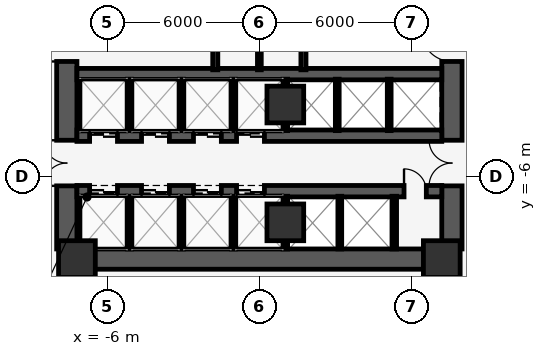
"""IFC4 building model, lengths in metres.
Left out: names, types, materials, properties, quantities, classifications, styles, units other than length and angle.
Written with IfcOpenShell. Run it as: python <this file> out.ifc"""

import sys

from ifc_helpers import new_model, si_unit, direction, frame, frame_2d, origin, origin_2d, place, context, subcontext, project, spatial, rectangle, extrude, element, fill, save


model = new_model("IFC4")
c1 = context("Model", 3, precision=1e-05, world=origin(), true_north=direction((0.0, 1.0)))
c2 = subcontext(c1, "Body", "Model", "MODEL_VIEW")
j1 = project(units=[si_unit("LENGTHUNIT", "METRE"), si_unit("PLANEANGLEUNIT", "RADIAN")], contexts=[c1])
p1 = place(None, origin())
s1 = spatial("IfcSite", under=j1, at=p1, CompositionType="ELEMENT")
p2 = place(p1, origin())
s2 = spatial("IfcBuilding", under=s1, at=p2, CompositionType="ELEMENT")
p3 = place(p2, frame((0.0, 0.0, 62.4)))
s3 = spatial("IfcBuildingStorey", under=s2, at=p3, CompositionType="ELEMENT", Elevation=62.4)
p4 = place(p3, frame((-7.6, -8.85, 0.0), z_axis=(0.0, 0.0, 1.0), x_axis=(0.0, 1.0, 0.0)))
e1 = element("IfcWall", 1, at=p4, inside=s3, PredefinedType="SHEAR", context=c2, shape_type="SweptSolid", body=[
    extrude(rectangle(XDim=8.95, YDim=0.8, at=frame_2d((4.475, 0.0))), origin(), (0.0, 0.0, 1.0), 4.35),
])
p5 = place(p4, frame((2.49, 0.0, 0.0)))
e2 = element("IfcOpeningElement", 2, at=p5, cuts=e1, PredefinedType="OPENING", context=c2, shape_type="SweptSolid", body=[
    extrude(rectangle(XDim=1.8, YDim=2.2, at=frame_2d((0.9, 1.1))), frame((0.0, 0.41, 0.0), z_axis=(0.0, -1.0, 0.0), x_axis=(1.0, 0.0, 0.0)), (0.0, 0.0, 1.0), 0.82),
])
p6 = place(p4, frame((7.4, 0.0, 0.0)))
e3 = element("IfcOpeningElement", 3, at=p6, cuts=e1, PredefinedType="OPENING", context=c2, shape_type="SweptSolid", body=[
    extrude(rectangle(XDim=1.2, YDim=2.15, at=frame_2d((0.6, 1.075))), frame((0.0, 0.41, 0.0), z_axis=(0.0, -1.0, 0.0), x_axis=(1.0, 0.0, 0.0)), (0.0, 0.0, 1.0), 0.82),
])
p7 = place(p3, frame((7.6, -8.85, 0.0), z_axis=(0.0, 0.0, 1.0), x_axis=(0.0, 1.0, 0.0)))
e4 = element("IfcWall", 4, at=p7, inside=s3, PredefinedType="SHEAR", context=c2, shape_type="SweptSolid", body=[
    extrude(rectangle(XDim=8.95, YDim=0.8, at=frame_2d((4.475, 0.0))), origin(), (0.0, 0.0, 1.0), 4.35),
])
p8 = place(p7, frame((2.49, 0.0, 0.0)))
e5 = element("IfcOpeningElement", 5, at=p8, cuts=e4, PredefinedType="OPENING", context=c2, shape_type="SweptSolid", body=[
    extrude(rectangle(XDim=1.8, YDim=2.2, at=frame_2d((0.9, 1.1))), frame((0.0, 0.41, 0.0), z_axis=(0.0, -1.0, 0.0), x_axis=(1.0, 0.0, 0.0)), (0.0, 0.0, 1.0), 0.82),
])
p9 = place(p7, frame((7.4, 0.0, 0.0)))
e6 = element("IfcOpeningElement", 6, at=p9, cuts=e4, PredefinedType="OPENING", context=c2, shape_type="SweptSolid", body=[
    extrude(rectangle(XDim=1.2, YDim=2.15, at=frame_2d((0.6, 1.075))), frame((0.0, 0.41, 0.0), z_axis=(0.0, -1.0, 0.0), x_axis=(1.0, 0.0, 0.0)), (0.0, 0.0, 1.0), 0.82),
])
p10 = place(p3, frame((-7.6, -9.25, 0.0), z_axis=(0.0, 0.0, 1.0), x_axis=(1.0, 0.0, 0.0)))
e7 = element("IfcWall", 7, at=p10, inside=s3, PredefinedType="SHEAR", context=c2, shape_type="SweptSolid", body=[
    extrude(rectangle(XDim=15.2, YDim=0.8, at=frame_2d((7.6, 0.0))), origin(), (0.0, 0.0, 1.0), 4.35),
])
p11 = place(p3, frame((-7.2, -1.95, 0.0), z_axis=(0.0, 0.0, 1.0), x_axis=(1.0, 0.0, 0.0)))
e8 = element("IfcWall", 8, at=p11, inside=s3, PredefinedType="SHEAR", context=c2, shape_type="SweptSolid", body=[
    extrude(rectangle(XDim=14.4, YDim=0.45, at=frame_2d((7.2, 0.0))), origin(), (0.0, 0.0, 1.0), 4.35),
])
p12 = place(p3, frame((-7.2, -4.38, 0.0), z_axis=(0.0, 0.0, 1.0), x_axis=(1.0, 0.0, 0.0)))
e9 = element("IfcWall", 9, at=p12, inside=s3, PredefinedType="SHEAR", context=c2, shape_type="SweptSolid", body=[
    extrude(rectangle(XDim=14.4, YDim=0.45, at=frame_2d((7.2, 0.0))), origin(), (0.0, 0.0, 1.0), 4.35),
])
p13 = place(p12, frame((0.5, 0.0, 0.0)))
e10 = element("IfcOpeningElement", 10, at=p13, cuts=e9, PredefinedType="OPENING", context=c2, shape_type="SweptSolid", body=[
    extrude(rectangle(XDim=1.1, YDim=2.2, at=frame_2d((0.55, 1.1))), frame((0.0, 0.235, 0.0), z_axis=(0.0, -1.0, 0.0), x_axis=(1.0, 0.0, 0.0)), (0.0, 0.0, 1.0), 0.47),
])
p14 = place(p12, frame((2.55, 0.0, 0.0)))
e11 = element("IfcOpeningElement", 11, at=p14, cuts=e9, PredefinedType="OPENING", context=c2, shape_type="SweptSolid", body=[
    extrude(rectangle(XDim=1.1, YDim=2.2, at=frame_2d((0.55, 1.1))), frame((0.0, 0.235, 0.0), z_axis=(0.0, -1.0, 0.0), x_axis=(1.0, 0.0, 0.0)), (0.0, 0.0, 1.0), 0.47),
])
p15 = place(p12, frame((4.6, 0.0, 0.0)))
e12 = element("IfcOpeningElement", 12, at=p15, cuts=e9, PredefinedType="OPENING", context=c2, shape_type="SweptSolid", body=[
    extrude(rectangle(XDim=1.1, YDim=2.2, at=frame_2d((0.55, 1.1))), frame((0.0, 0.235, 0.0), z_axis=(0.0, -1.0, 0.0), x_axis=(1.0, 0.0, 0.0)), (0.0, 0.0, 1.0), 0.47),
])
p16 = place(p12, frame((6.3, 0.0, 0.0)))
e13 = element("IfcOpeningElement", 13, at=p16, cuts=e9, PredefinedType="OPENING", context=c2, shape_type="SweptSolid", body=[
    extrude(rectangle(XDim=1.1, YDim=2.2, at=frame_2d((0.55, 1.1))), frame((0.0, 0.235, 0.0), z_axis=(0.0, -1.0, 0.0), x_axis=(1.0, 0.0, 0.0)), (0.0, 0.0, 1.0), 0.47),
])
p17 = place(p3, frame((-7.2, -6.57, 0.0), z_axis=(0.0, 0.0, 1.0), x_axis=(1.0, 0.0, 0.0)))
e14 = element("IfcWall", 14, at=p17, inside=s3, PredefinedType="SHEAR", context=c2, shape_type="SweptSolid", body=[
    extrude(rectangle(XDim=14.4, YDim=0.45, at=frame_2d((7.2, 0.0))), origin(), (0.0, 0.0, 1.0), 4.35),
])
p18 = place(p17, frame((0.5, 0.0, 0.0)))
e15 = element("IfcOpeningElement", 15, at=p18, cuts=e14, PredefinedType="OPENING", context=c2, shape_type="SweptSolid", body=[
    extrude(rectangle(XDim=1.1, YDim=2.2, at=frame_2d((0.55, 1.1))), frame((0.0, 0.235, 0.0), z_axis=(0.0, -1.0, 0.0), x_axis=(1.0, 0.0, 0.0)), (0.0, 0.0, 1.0), 0.47),
])
p19 = place(p17, frame((2.55, 0.0, 0.0)))
e16 = element("IfcOpeningElement", 16, at=p19, cuts=e14, PredefinedType="OPENING", context=c2, shape_type="SweptSolid", body=[
    extrude(rectangle(XDim=1.1, YDim=2.2, at=frame_2d((0.55, 1.1))), frame((0.0, 0.235, 0.0), z_axis=(0.0, -1.0, 0.0), x_axis=(1.0, 0.0, 0.0)), (0.0, 0.0, 1.0), 0.47),
])
p20 = place(p17, frame((4.6, 0.0, 0.0)))
e17 = element("IfcOpeningElement", 17, at=p20, cuts=e14, PredefinedType="OPENING", context=c2, shape_type="SweptSolid", body=[
    extrude(rectangle(XDim=1.1, YDim=2.2, at=frame_2d((0.55, 1.1))), frame((0.0, 0.235, 0.0), z_axis=(0.0, -1.0, 0.0), x_axis=(1.0, 0.0, 0.0)), (0.0, 0.0, 1.0), 0.47),
])
p21 = place(p17, frame((6.3, 0.0, 0.0)))
e18 = element("IfcOpeningElement", 18, at=p21, cuts=e14, PredefinedType="OPENING", context=c2, shape_type="SweptSolid", body=[
    extrude(rectangle(XDim=1.1, YDim=2.2, at=frame_2d((0.55, 1.1))), frame((0.0, 0.235, 0.0), z_axis=(0.0, -1.0, 0.0), x_axis=(1.0, 0.0, 0.0)), (0.0, 0.0, 1.0), 0.47),
])
p22 = place(p17, frame((12.91, 0.0, 0.0)))
e19 = element("IfcOpeningElement", 19, at=p22, cuts=e14, PredefinedType="OPENING", context=c2, shape_type="SweptSolid", body=[
    extrude(rectangle(XDim=0.88, YDim=2.15, at=frame_2d((0.44, 1.075))), frame((0.0, 0.235, 0.0), z_axis=(0.0, -1.0, 0.0), x_axis=(1.0, 0.0, 0.0)), (0.0, 0.0, 1.0), 0.47),
])
for number, where, z_axis, x_axis in (
    (20, (-7.2, -9.25, 0.0), (0.0, 0.0, 1.0), (1.0, 0.0, 0.0)),
    (21, (7.2, -9.25, 0.0), (0.0, 0.0, 1.0), (1.0, 0.0, 0.0)),
    (22, (1.025, -3.15, 0.0), (0.0, 0.0, 1.0), (1.0, 0.0, 0.0)),
    (23, (1.025, -7.8, 0.0), (0.0, 0.0, 1.0), (1.0, 0.0, 0.0)),
):
    element("IfcColumn", number, at=place(p3, frame(where, z_axis=z_axis, x_axis=x_axis)), inside=s3, PredefinedType="COLUMN", context=c2, shape_type="SweptSolid", body=[
        extrude(rectangle(XDim=1.45, YDim=1.45, at=origin_2d()), origin(), (0.0, 0.0, 1.0), 4.6),
    ])
p23 = place(p3, frame((-0.115, 39.555, 0.0), z_axis=(0.0, 0.0, 1.0), x_axis=(0.605877389385, -0.795558036243, 0.0)))
e24 = element("IfcWall", 24, at=p23, inside=s3, PredefinedType="STANDARD", context=c2, shape_type="SweptSolid", body=[
    extrude(rectangle(XDim=64.058, YDim=0.32, at=frame_2d((32.029, 0.0))), origin(), (0.0, 0.0, 1.0), 4.35),
])
p24 = place(p23, frame((6.179, 0.0, 0.85)))
e25 = element("IfcOpeningElement", 25, at=p24, cuts=e24, PredefinedType="OPENING", context=c2, shape_type="SweptSolid", body=[
    extrude(rectangle(XDim=1.3, YDim=2.1, at=frame_2d((0.65, 1.05))), frame((0.0, 0.17, 0.0), z_axis=(0.0, -1.0, 0.0), x_axis=(1.0, 0.0, 0.0)), (0.0, 0.0, 1.0), 0.34),
])
p25 = place(p23, frame((11.779, 0.0, 0.85)))
e26 = element("IfcOpeningElement", 26, at=p25, cuts=e24, PredefinedType="OPENING", context=c2, shape_type="SweptSolid", body=[
    extrude(rectangle(XDim=1.3, YDim=2.1, at=frame_2d((0.65, 1.05))), frame((0.0, 0.17, 0.0), z_axis=(0.0, -1.0, 0.0), x_axis=(1.0, 0.0, 0.0)), (0.0, 0.0, 1.0), 0.34),
])
p26 = place(p23, frame((17.379, 0.0, 0.85)))
e27 = element("IfcOpeningElement", 27, at=p26, cuts=e24, PredefinedType="OPENING", context=c2, shape_type="SweptSolid", body=[
    extrude(rectangle(XDim=1.3, YDim=2.1, at=frame_2d((0.65, 1.05))), frame((0.0, 0.17, 0.0), z_axis=(0.0, -1.0, 0.0), x_axis=(1.0, 0.0, 0.0)), (0.0, 0.0, 1.0), 0.34),
])
p27 = place(p23, frame((50.979, 0.0, 0.85)))
e28 = element("IfcOpeningElement", 28, at=p27, cuts=e24, PredefinedType="OPENING", context=c2, shape_type="SweptSolid", body=[
    extrude(rectangle(XDim=1.3, YDim=2.1, at=frame_2d((0.65, 1.05))), frame((0.0, 0.17, 0.0), z_axis=(0.0, -1.0, 0.0), x_axis=(1.0, 0.0, 0.0)), (0.0, 0.0, 1.0), 0.34),
])
p28 = place(p23, frame((56.579, 0.0, 0.85)))
e29 = element("IfcOpeningElement", 29, at=p28, cuts=e24, PredefinedType="OPENING", context=c2, shape_type="SweptSolid", body=[
    extrude(rectangle(XDim=1.3, YDim=2.1, at=frame_2d((0.65, 1.05))), frame((0.0, 0.17, 0.0), z_axis=(0.0, -1.0, 0.0), x_axis=(1.0, 0.0, 0.0)), (0.0, 0.0, 1.0), 0.34),
])
for number, where, z_axis, x_axis in (
    (30, (-5.125, -4.18, 0.0), (0.0, 0.0, 1.0), (0.0, 1.0, 0.0)),
    (31, (-3.075, -4.18, 0.0), (0.0, 0.0, 1.0), (0.0, 1.0, 0.0)),
    (32, (-1.025, -4.18, 0.0), (0.0, 0.0, 1.0), (0.0, 1.0, 0.0)),
):
    element("IfcWall", number, at=place(p3, frame(where, z_axis=z_axis, x_axis=x_axis)), inside=s3, PredefinedType="PARTITIONING", context=c2, shape_type="SweptSolid", body=[
        extrude(rectangle(XDim=2.03, YDim=0.15, at=frame_2d((1.015, 0.0))), origin(), (0.0, 0.0, 1.0), 4.35),
    ])
p29 = place(p3, frame((1.025, -4.18, 0.0), z_axis=(0.0, 0.0, 1.0), x_axis=(0.0, 1.0, 0.0)))
e33 = element("IfcWall", 33, at=p29, inside=s3, PredefinedType="PARTITIONING", context=c2, shape_type="SweptSolid", body=[
    extrude(rectangle(XDim=2.03, YDim=0.18, at=frame_2d((1.015, 0.0))), origin(), (0.0, 0.0, 1.0), 3.398),
])
for number, where, z_axis, x_axis in (
    (34, (3.075, -4.18, 0.0), (0.0, 0.0, 1.0), (0.0, 1.0, 0.0)),
    (35, (5.125, -4.18, 0.0), (0.0, 0.0, 1.0), (0.0, 1.0, 0.0)),
):
    element("IfcWall", number, at=place(p3, frame(where, z_axis=z_axis, x_axis=x_axis)), inside=s3, PredefinedType="PARTITIONING", context=c2, shape_type="SweptSolid", body=[
        extrude(rectangle(XDim=2.03, YDim=0.15, at=frame_2d((1.015, 0.0))), origin(), (0.0, 0.0, 1.0), 4.35),
    ])
for number, where, z_axis, x_axis in (
    (36, (-5.125, -8.85, 0.0), (0.0, 0.0, 1.0), (0.0, 1.0, 0.0)),
    (37, (-3.075, -8.85, 0.0), (0.0, 0.0, 1.0), (0.0, 1.0, 0.0)),
    (38, (-1.025, -8.85, 0.0), (0.0, 0.0, 1.0), (0.0, 1.0, 0.0)),
):
    element("IfcWall", number, at=place(p3, frame(where, z_axis=z_axis, x_axis=x_axis)), inside=s3, PredefinedType="PARTITIONING", context=c2, shape_type="SweptSolid", body=[
        extrude(rectangle(XDim=2.08, YDim=0.15, at=frame_2d((1.04, 0.0))), origin(), (0.0, 0.0, 1.0), 4.35),
    ])
p30 = place(p3, frame((1.025, -8.85, 0.0), z_axis=(0.0, 0.0, 1.0), x_axis=(0.0, 1.0, 0.0)))
e39 = element("IfcWall", 39, at=p30, inside=s3, PredefinedType="PARTITIONING", context=c2, shape_type="SweptSolid", body=[
    extrude(rectangle(XDim=2.08, YDim=0.18, at=frame_2d((1.04, 0.0))), origin(), (0.0, 0.0, 1.0), 3.398),
])
p31 = place(p3, frame((3.175, -8.85, 0.0), z_axis=(0.0, 0.0, 1.0), x_axis=(0.0, 1.0, 0.0)))
e40 = element("IfcWall", 40, at=p31, inside=s3, PredefinedType="PARTITIONING", context=c2, shape_type="SweptSolid", body=[
    extrude(rectangle(XDim=2.08, YDim=0.15, at=frame_2d((1.04, 0.0))), origin(), (0.0, 0.0, 1.0), 4.35),
])
p32 = place(p3, frame((5.325, -8.85, 0.0), z_axis=(0.0, 0.0, 1.0), x_axis=(0.0, 1.0, 0.0)))
e41 = element("IfcWall", 41, at=p32, inside=s3, PredefinedType="PARTITIONING", context=c2, shape_type="SweptSolid", body=[
    extrude(rectangle(XDim=2.08, YDim=0.18, at=frame_2d((1.04, 0.0))), origin(), (0.0, 0.0, 1.0), 4.35),
])
p33 = place(p3, frame((-1.74, -1.78, 0.0), z_axis=(0.0, 0.0, 1.0), x_axis=(0.0, 1.0, 0.0)))
e42 = element("IfcWall", 42, at=p33, inside=s3, PredefinedType="PARTITIONING", context=c2, shape_type="SweptSolid", body=[
    extrude(rectangle(XDim=2.98, YDim=0.2, at=frame_2d((1.49, 0.0))), origin(), (0.0, 0.0, 1.0), 4.35),
])
p34 = place(p33, frame((0.89, 0.0, 0.0)))
e43 = element("IfcOpeningElement", 43, at=p34, cuts=e42, PredefinedType="OPENING", context=c2, shape_type="SweptSolid", body=[
    extrude(rectangle(XDim=0.88, YDim=2.15, at=frame_2d((0.44, 1.075))), frame((0.0, 0.11, 0.0), z_axis=(0.0, -1.0, 0.0), x_axis=(1.0, 0.0, 0.0)), (0.0, 0.0, 1.0), 0.22),
])
p35 = place(p3, frame((1.74, -1.78, 0.0), z_axis=(0.0, 0.0, 1.0), x_axis=(0.0, 1.0, 0.0)))
e44 = element("IfcWall", 44, at=p35, inside=s3, PredefinedType="PARTITIONING", context=c2, shape_type="SweptSolid", body=[
    extrude(rectangle(XDim=2.98, YDim=0.2, at=frame_2d((1.49, 0.0))), origin(), (0.0, 0.0, 1.0), 4.35),
])
p36 = place(p35, frame((0.89, 0.0, 0.0)))
e45 = element("IfcOpeningElement", 45, at=p36, cuts=e44, PredefinedType="OPENING", context=c2, shape_type="SweptSolid", body=[
    extrude(rectangle(XDim=0.88, YDim=2.15, at=frame_2d((0.44, 1.075))), frame((0.0, 0.11, 0.0), z_axis=(0.0, -1.0, 0.0), x_axis=(1.0, 0.0, 0.0)), (0.0, 0.0, 1.0), 0.22),
])
p37 = place(p3, frame((0.0, -1.78, 0.0), z_axis=(0.0, 0.0, 1.0), x_axis=(0.0, 1.0, 0.0)))
e46 = element("IfcWall", 46, at=p37, inside=s3, PredefinedType="PARTITIONING", context=c2, shape_type="SweptSolid", body=[
    extrude(rectangle(XDim=2.83, YDim=0.15, at=frame_2d((1.415, 0.0))), origin(), (0.0, 0.0, 1.0), 4.35),
])
p38 = place(p13, origin())
e47 = element("IfcDoor", 47, at=p38, inside=s3, OperationType="DOUBLE_DOOR_SLIDING", PredefinedType="DOOR", context=c2, shape_type="SweptSolid", body=[
    extrude(rectangle(XDim=1.1, YDim=2.2, at=frame_2d((0.55, 1.1))), frame((0.0, 0.025, 0.0), z_axis=(0.0, -1.0, 0.0), x_axis=(1.0, 0.0, 0.0)), (0.0, 0.0, 1.0), 0.05),
])
fill(e10, e47)
p39 = place(p14, origin())
e48 = element("IfcDoor", 48, at=p39, inside=s3, OperationType="DOUBLE_DOOR_SLIDING", PredefinedType="DOOR", context=c2, shape_type="SweptSolid", body=[
    extrude(rectangle(XDim=1.1, YDim=2.2, at=frame_2d((0.55, 1.1))), frame((0.0, 0.025, 0.0), z_axis=(0.0, -1.0, 0.0), x_axis=(1.0, 0.0, 0.0)), (0.0, 0.0, 1.0), 0.05),
])
fill(e11, e48)
p40 = place(p15, origin())
e49 = element("IfcDoor", 49, at=p40, inside=s3, OperationType="DOUBLE_DOOR_SLIDING", PredefinedType="DOOR", context=c2, shape_type="SweptSolid", body=[
    extrude(rectangle(XDim=1.1, YDim=2.2, at=frame_2d((0.55, 1.1))), frame((0.0, 0.025, 0.0), z_axis=(0.0, -1.0, 0.0), x_axis=(1.0, 0.0, 0.0)), (0.0, 0.0, 1.0), 0.05),
])
fill(e12, e49)
p41 = place(p16, origin())
e50 = element("IfcDoor", 50, at=p41, inside=s3, OperationType="DOUBLE_DOOR_SLIDING", PredefinedType="DOOR", context=c2, shape_type="SweptSolid", body=[
    extrude(rectangle(XDim=1.1, YDim=2.2, at=frame_2d((0.55, 1.1))), frame((0.0, 0.025, 0.0), z_axis=(0.0, -1.0, 0.0), x_axis=(1.0, 0.0, 0.0)), (0.0, 0.0, 1.0), 0.05),
])
fill(e13, e50)
p42 = place(p18, origin())
e51 = element("IfcDoor", 51, at=p42, inside=s3, OperationType="DOUBLE_DOOR_SLIDING", PredefinedType="DOOR", context=c2, shape_type="SweptSolid", body=[
    extrude(rectangle(XDim=1.1, YDim=2.2, at=frame_2d((0.55, 1.1))), frame((0.0, 0.025, 0.0), z_axis=(0.0, -1.0, 0.0), x_axis=(1.0, 0.0, 0.0)), (0.0, 0.0, 1.0), 0.05),
])
fill(e15, e51)
p43 = place(p19, origin())
e52 = element("IfcDoor", 52, at=p43, inside=s3, OperationType="DOUBLE_DOOR_SLIDING", PredefinedType="DOOR", context=c2, shape_type="SweptSolid", body=[
    extrude(rectangle(XDim=1.1, YDim=2.2, at=frame_2d((0.55, 1.1))), frame((0.0, 0.025, 0.0), z_axis=(0.0, -1.0, 0.0), x_axis=(1.0, 0.0, 0.0)), (0.0, 0.0, 1.0), 0.05),
])
fill(e16, e52)
p44 = place(p20, origin())
e53 = element("IfcDoor", 53, at=p44, inside=s3, OperationType="DOUBLE_DOOR_SLIDING", PredefinedType="DOOR", context=c2, shape_type="SweptSolid", body=[
    extrude(rectangle(XDim=1.1, YDim=2.2, at=frame_2d((0.55, 1.1))), frame((0.0, 0.025, 0.0), z_axis=(0.0, -1.0, 0.0), x_axis=(1.0, 0.0, 0.0)), (0.0, 0.0, 1.0), 0.05),
])
fill(e17, e53)
p45 = place(p21, origin())
e54 = element("IfcDoor", 54, at=p45, inside=s3, OperationType="DOUBLE_DOOR_SLIDING", PredefinedType="DOOR", context=c2, shape_type="SweptSolid", body=[
    extrude(rectangle(XDim=1.1, YDim=2.2, at=frame_2d((0.55, 1.1))), frame((0.0, 0.025, 0.0), z_axis=(0.0, -1.0, 0.0), x_axis=(1.0, 0.0, 0.0)), (0.0, 0.0, 1.0), 0.05),
])
fill(e18, e54)
p46 = place(p5, origin())
e55 = element("IfcDoor", 55, at=p46, inside=s3, OperationType="DOUBLE_DOOR_SINGLE_SWING", PredefinedType="DOOR", context=c2, shape_type="SweptSolid", body=[
    extrude(rectangle(XDim=1.8, YDim=2.2, at=frame_2d((0.9, 1.1))), frame((0.0, 0.025, 0.0), z_axis=(0.0, -1.0, 0.0), x_axis=(1.0, 0.0, 0.0)), (0.0, 0.0, 1.0), 0.05),
])
fill(e2, e55)
p47 = place(p6, origin())
e56 = element("IfcDoor", 56, at=p47, inside=s3, OperationType="SINGLE_SWING_LEFT", PredefinedType="DOOR", context=c2, shape_type="SweptSolid", body=[
    extrude(rectangle(XDim=1.2, YDim=2.15, at=frame_2d((0.6, 1.075))), frame((0.0, 0.025, 0.0), z_axis=(0.0, -1.0, 0.0), x_axis=(1.0, 0.0, 0.0)), (0.0, 0.0, 1.0), 0.05),
])
fill(e3, e56)
p48 = place(p8, origin())
e57 = element("IfcDoor", 57, at=p48, inside=s3, OperationType="DOUBLE_DOOR_SINGLE_SWING", PredefinedType="DOOR", context=c2, shape_type="SweptSolid", body=[
    extrude(rectangle(XDim=1.8, YDim=2.2, at=frame_2d((0.9, 1.1))), frame((0.0, 0.025, 0.0), z_axis=(0.0, -1.0, 0.0), x_axis=(1.0, 0.0, 0.0)), (0.0, 0.0, 1.0), 0.05),
])
fill(e5, e57)
p49 = place(p9, origin())
e58 = element("IfcDoor", 58, at=p49, inside=s3, OperationType="SINGLE_SWING_RIGHT", PredefinedType="DOOR", context=c2, shape_type="SweptSolid", body=[
    extrude(rectangle(XDim=1.2, YDim=2.15, at=frame_2d((0.6, 1.075))), frame((0.0, 0.025, 0.0), z_axis=(0.0, -1.0, 0.0), x_axis=(1.0, 0.0, 0.0)), (0.0, 0.0, 1.0), 0.05),
])
fill(e6, e58)
p50 = place(p22, origin())
e59 = element("IfcDoor", 59, at=p50, inside=s3, OperationType="SINGLE_SWING_LEFT", PredefinedType="DOOR", context=c2, shape_type="SweptSolid", body=[
    extrude(rectangle(XDim=0.88, YDim=2.15, at=frame_2d((0.44, 1.075))), frame((0.0, 0.025, 0.0), z_axis=(0.0, -1.0, 0.0), x_axis=(1.0, 0.0, 0.0)), (0.0, 0.0, 1.0), 0.05),
])
fill(e19, e59)
save(model, sys.argv[1])
